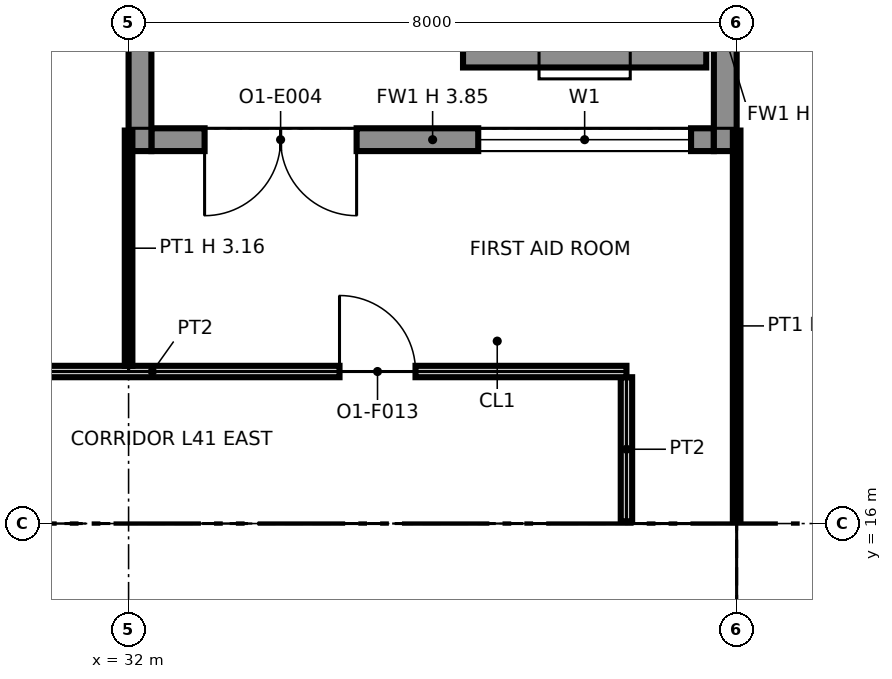
"""IFC4 building model, lengths in metres.
Left out: names, types, materials, properties, quantities, classifications, styles, units other than length and angle.
Written with IfcOpenShell. Run it as: python <this file> out.ifc"""

import sys

from ifc_helpers import new_model, si_unit, direction, frame, frame_2d, origin, origin_2d, place, context, subcontext, project, spatial, polyline, rectangle, i_section, outline, extrude, element, fill, save


model = new_model("IFC4")
c1 = context("Model", 3, precision=1e-05, world=origin(), true_north=direction((0.0, 1.0)))
c2 = subcontext(c1, "Body", "Model", "MODEL_VIEW")
j1 = project(units=[si_unit("LENGTHUNIT", "METRE"), si_unit("PLANEANGLEUNIT", "RADIAN")], contexts=[c1])
p1 = place(None, origin())
s1 = spatial("IfcSite", under=j1, at=p1, CompositionType="ELEMENT")
p2 = place(p1, origin())
s2 = spatial("IfcBuilding", under=s1, at=p2, CompositionType="ELEMENT")
p3 = place(p2, frame((0.0, 0.0, 197.0)))
s3 = spatial("IfcBuildingStorey", under=s2, at=p3, CompositionType="ELEMENT", Elevation=197.0)
for number, where, z_axis, x_axis in (
    (1, (32.0, 16.0, 0.0), (0.0, 0.0, 1.0), (1.0, 0.0, 0.0)),
    (2, (40.0, 16.0, 0.0), (0.0, 0.0, 1.0), (1.0, 0.0, 0.0)),
):
    element("IfcColumn", number, at=place(p3, frame(where, z_axis=z_axis, x_axis=x_axis)), inside=s3, PredefinedType="COLUMN", context=c2, shape_type="SweptSolid", body=[
        extrude(i_section(OverallWidth=0.394, OverallDepth=0.376, WebThickness=0.017, FlangeThickness=0.028, at=origin_2d()), origin(), (0.0, 0.0, 1.0), 3.85),
    ])
p4 = place(p3, frame((39.7, 21.05, 0.0), z_axis=(0.0, 0.0, 1.0), x_axis=(-1.0, 0.0, 0.0)))
e3 = element("IfcWall", 3, at=p4, inside=s3, PredefinedType="SOLIDWALL", context=c2, shape_type="SweptSolid", body=[
    extrude(rectangle(XDim=7.4, YDim=0.3, at=frame_2d((3.7, 0.0))), origin(), (0.0, 0.0, 1.0), 3.85),
])
p5 = place(p4, frame((0.3, 0.0, 0.9)))
e4 = element("IfcOpeningElement", 4, at=p5, cuts=e3, PredefinedType="OPENING", context=c2, shape_type="SweptSolid", body=[
    extrude(rectangle(XDim=2.8, YDim=2.2, at=frame_2d((1.4, 1.1))), frame((0.0, 0.16, 0.0), z_axis=(0.0, -1.0, 0.0), x_axis=(1.0, 0.0, 0.0)), (0.0, 0.0, 1.0), 0.32),
])
p6 = place(p4, frame((4.7, 0.0, 0.0)))
e5 = element("IfcOpeningElement", 5, at=p6, cuts=e3, PredefinedType="OPENING", context=c2, shape_type="SweptSolid", body=[
    extrude(rectangle(XDim=2.0, YDim=2.4, at=frame_2d((1.0, 1.2))), frame((0.0, 0.16, 0.0), z_axis=(0.0, -1.0, 0.0), x_axis=(1.0, 0.0, 0.0)), (0.0, 0.0, 1.0), 0.32),
])
p7 = place(p3, frame((39.85, 23.9, 0.0), z_axis=(0.0, 0.0, 1.0), x_axis=(0.0, -1.0, 0.0)))
e6 = element("IfcWall", 6, at=p7, inside=s3, PredefinedType="SOLIDWALL", context=c2, shape_type="SweptSolid", body=[
    extrude(rectangle(XDim=3.0, YDim=0.3, at=frame_2d((1.5, 0.0))), origin(), (0.0, 0.0, 1.0), 3.156),
])
p8 = place(p3, frame((32.15, 23.9, 0.0), z_axis=(0.0, 0.0, 1.0), x_axis=(0.0, -1.0, 0.0)))
e7 = element("IfcWall", 7, at=p8, inside=s3, PredefinedType="SOLIDWALL", context=c2, shape_type="SweptSolid", body=[
    extrude(rectangle(XDim=3.0, YDim=0.3, at=frame_2d((1.5, 0.0))), origin(), (0.0, 0.0, 1.0), 3.237),
])
p9 = place(p3, frame((39.6, 22.45, 0.0), z_axis=(0.0, 0.0, 1.0), x_axis=(-1.0, 0.0, 0.0)))
e8 = element("IfcWall", 8, at=p9, inside=s3, PredefinedType="SOLIDWALL", context=c2, shape_type="SweptSolid", body=[
    extrude(rectangle(XDim=3.2, YDim=0.9, at=frame_2d((1.6, 0.0))), origin(), (0.0, 0.0, 1.0), 0.6),
])
p10 = place(p3, frame((24.65, 15.25, 0.0), z_axis=(0.0, 0.0, 1.0), x_axis=(1.0, 0.0, 0.0)))
e9 = element("IfcWall", 9, at=p10, inside=s3, PredefinedType="PARTITIONING", context=c2, shape_type="SweptSolid", body=[
    extrude(outline(polyline([(0.0, 0.0), (14.7, 0.0), (14.7, 3.85), (7.469, 3.85), (7.468, 3.242), (7.232, 3.242), (7.231, 3.85), (0.0, 3.85), (0.0, 0.0)])), frame((0.0, 0.1, 0.0), z_axis=(0.0, -1.0, 0.0), x_axis=(1.0, 0.0, 0.0)), (0.0, 0.0, 1.0), 0.2),
])
p11 = place(p10, frame((2.85, 0.0, 0.0)))
e10 = element("IfcOpeningElement", 10, at=p11, cuts=e9, PredefinedType="OPENING", context=c2, shape_type="SweptSolid", body=[
    extrude(rectangle(XDim=1.8, YDim=2.1, at=frame_2d((0.9, 1.05))), frame((0.0, 0.11, 0.0), z_axis=(0.0, -1.0, 0.0), x_axis=(1.0, 0.0, 0.0)), (0.0, 0.0, 1.0), 0.22),
])
p12 = place(p10, frame((9.95, 0.0, 0.0), z_axis=(0.0, 0.0, 1.0), x_axis=(-1.0, 0.0, 0.0)))
e11 = element("IfcOpeningElement", 11, at=p12, cuts=e9, PredefinedType="OPENING", context=c2, shape_type="SweptSolid", body=[
    extrude(rectangle(XDim=1.4, YDim=2.1, at=frame_2d((0.7, 1.05))), frame((0.0, 0.11, 0.0), z_axis=(0.0, -1.0, 0.0), x_axis=(1.0, 0.0, 0.0)), (0.0, 0.0, 1.0), 0.22),
])
p13 = place(p10, frame((13.4, 0.0, 0.0), z_axis=(0.0, 0.0, 1.0), x_axis=(-1.0, 0.0, 0.0)))
e12 = element("IfcOpeningElement", 12, at=p13, cuts=e9, PredefinedType="OPENING", context=c2, shape_type="SweptSolid", body=[
    extrude(rectangle(XDim=1.4, YDim=2.1, at=frame_2d((0.7, 1.05))), frame((0.0, 0.11, 0.0), z_axis=(0.0, -1.0, 0.0), x_axis=(1.0, 0.0, 0.0)), (0.0, 0.0, 1.0), 0.22),
])
p14 = place(p3, frame((32.0, 13.55, 0.0), z_axis=(0.0, 0.0, 1.0), x_axis=(0.0, 1.0, 0.0)))
e13 = element("IfcWall", 13, at=p14, inside=s3, PredefinedType="PARTITIONING", context=c2, shape_type="SweptSolid", body=[
    extrude(rectangle(XDim=1.6, YDim=0.6, at=frame_2d((0.8, 0.0))), origin(), (0.0, 0.0, 1.0), 3.242),
])
for number, where, z_axis, x_axis in (
    (14, (35.6, 8.85, 0.0), (0.0, 0.0, 1.0), (0.0, 1.0, 0.0)),
    (15, (39.25, 8.85, 0.0), (0.0, 0.0, 1.0), (0.0, 1.0, 0.0)),
):
    element("IfcWall", number, at=place(p3, frame(where, z_axis=z_axis, x_axis=x_axis)), inside=s3, PredefinedType="PARTITIONING", context=c2, shape_type="SweptSolid", body=[
        extrude(rectangle(XDim=6.3, YDim=0.2, at=frame_2d((3.15, 0.0))), origin(), (0.0, 0.0, 1.0), 3.85),
    ])
p15 = place(p3, frame((38.55, 16.03, 0.0), z_axis=(0.0, 0.0, 1.0), x_axis=(0.0, 1.0, 0.0)))
e16 = element("IfcWall", 16, at=p15, inside=s3, PredefinedType="PARTITIONING", context=c2, shape_type="SweptSolid", body=[
    extrude(rectangle(XDim=1.895, YDim=0.15, at=frame_2d((0.948, 0.0))), origin(), (0.0, 0.0, 1.0), 3.85),
])
p16 = place(p3, frame((40.0, 16.03, 0.0), z_axis=(0.0, 0.0, 1.0), x_axis=(0.0, 1.0, 0.0)))
e17 = element("IfcWall", 17, at=p16, inside=s3, PredefinedType="PARTITIONING", context=c2, shape_type="SweptSolid", body=[
    extrude(rectangle(XDim=5.14, YDim=0.1, at=frame_2d((2.57, 0.0))), origin(), (0.0, 0.0, 1.0), 3.157),
])
p17 = place(p3, frame((26.075, 18.0, 0.0), z_axis=(0.0, 0.0, 1.0), x_axis=(1.0, 0.0, 0.0)))
e18 = element("IfcWall", 18, at=p17, inside=s3, PredefinedType="PARTITIONING", context=c2, shape_type="SweptSolid", body=[
    extrude(rectangle(XDim=12.475, YDim=0.15, at=frame_2d((6.238, 0.0))), origin(), (0.0, 0.0, 1.0), 3.85),
])
p18 = place(p17, frame((8.7, 0.0, 0.0)))
e19 = element("IfcOpeningElement", 19, at=p18, cuts=e18, PredefinedType="OPENING", context=c2, shape_type="SweptSolid", body=[
    extrude(rectangle(XDim=1.0, YDim=2.1, at=frame_2d((0.5, 1.05))), frame((0.0, 0.085, 0.0), z_axis=(0.0, -1.0, 0.0), x_axis=(1.0, 0.0, 0.0)), (0.0, 0.0, 1.0), 0.17),
])
p19 = place(p17, frame((3.425, 0.0, 0.0)))
e20 = element("IfcOpeningElement", 20, at=p19, cuts=e18, PredefinedType="OPENING", context=c2, shape_type="SweptSolid", body=[
    extrude(rectangle(XDim=1.0, YDim=2.1, at=frame_2d((0.5, 1.05))), frame((0.0, 0.085, 0.0), z_axis=(0.0, -1.0, 0.0), x_axis=(1.0, 0.0, 0.0)), (0.0, 0.0, 1.0), 0.17),
])
p20 = place(p3, frame((32.0, 18.075, 0.0), z_axis=(0.0, 0.0, 1.0), x_axis=(0.0, 1.0, 0.0)))
e21 = element("IfcWall", 21, at=p20, inside=s3, PredefinedType="PARTITIONING", context=c2, shape_type="SweptSolid", body=[
    extrude(rectangle(XDim=3.095, YDim=0.1, at=frame_2d((1.547, 0.0))), origin(), (0.0, 0.0, 1.0), 3.157),
])
p21 = place(p5, origin())
e22 = element("IfcWindow", 22, at=p21, inside=s3, PartitioningType="SINGLE_PANEL", PredefinedType="WINDOW", context=c2, shape_type="SweptSolid", body=[
    extrude(rectangle(XDim=2.8, YDim=2.2, at=frame_2d((1.4, 1.1))), frame((0.0, 0.03, 0.0), z_axis=(0.0, -1.0, 0.0), x_axis=(1.0, 0.0, 0.0)), (0.0, 0.0, 1.0), 0.06),
])
fill(e4, e22)
p22 = place(p6, origin())
e23 = element("IfcDoor", 23, at=p22, inside=s3, OperationType="DOUBLE_DOOR_SINGLE_SWING", PredefinedType="DOOR", context=c2, shape_type="SweptSolid", body=[
    extrude(rectangle(XDim=2.0, YDim=2.4, at=frame_2d((1.0, 1.2))), frame((0.0, 0.025, 0.0), z_axis=(0.0, -1.0, 0.0), x_axis=(1.0, 0.0, 0.0)), (0.0, 0.0, 1.0), 0.05),
])
fill(e5, e23)
p23 = place(p12, origin())
e24 = element("IfcDoor", 24, at=p23, inside=s3, OperationType="DOUBLE_DOOR_SINGLE_SWING", PredefinedType="NOTDEFINED", context=c2, shape_type="SweptSolid", body=[
    extrude(rectangle(XDim=1.4, YDim=2.1, at=frame_2d((0.7, 1.05))), frame((0.0, 0.025, 0.0), z_axis=(0.0, -1.0, 0.0), x_axis=(1.0, 0.0, 0.0)), (0.0, 0.0, 1.0), 0.05),
])
fill(e11, e24)
p24 = place(p13, origin())
e25 = element("IfcDoor", 25, at=p24, inside=s3, OperationType="DOUBLE_DOOR_SINGLE_SWING", PredefinedType="NOTDEFINED", context=c2, shape_type="SweptSolid", body=[
    extrude(rectangle(XDim=1.4, YDim=2.1, at=frame_2d((0.7, 1.05))), frame((0.0, 0.025, 0.0), z_axis=(0.0, -1.0, 0.0), x_axis=(1.0, 0.0, 0.0)), (0.0, 0.0, 1.0), 0.05),
])
fill(e12, e25)
p25 = place(p18, origin())
e26 = element("IfcDoor", 26, at=p25, inside=s3, OperationType="SINGLE_SWING_LEFT", PredefinedType="DOOR", context=c2, shape_type="SweptSolid", body=[
    extrude(rectangle(XDim=1.0, YDim=2.1, at=frame_2d((0.5, 1.05))), frame((0.0, 0.025, 0.0), z_axis=(0.0, -1.0, 0.0), x_axis=(1.0, 0.0, 0.0)), (0.0, 0.0, 1.0), 0.05),
])
fill(e19, e26)
save(model, sys.argv[1])
